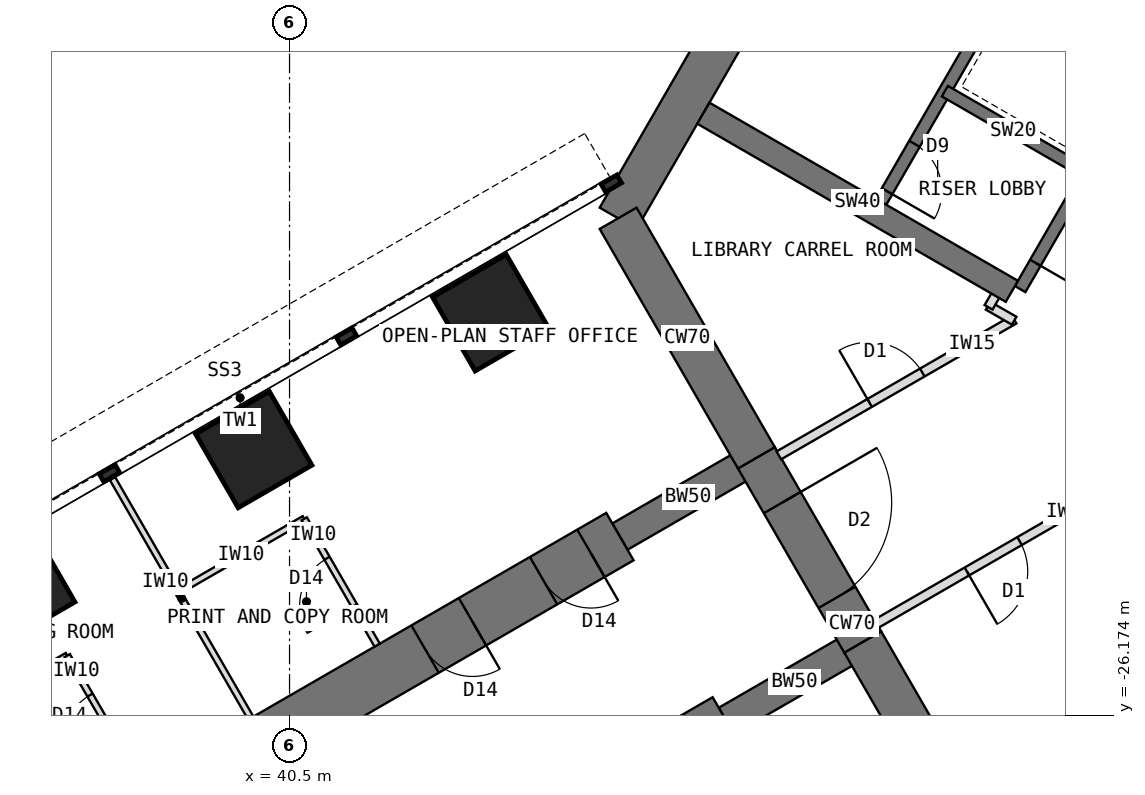
"""IFC4 building model, lengths in metres.
Left out: names, types, materials, properties, quantities, classifications, styles, units other than length and angle.
Written with IfcOpenShell. Run it as: python <this file> out.ifc"""

import sys

from ifc_helpers import new_model, si_unit, direction, frame, frame_2d, origin, origin_2d, place, context, subcontext, project, spatial, rectangle, extrude, element, fill, save


model = new_model("IFC4")
c1 = context("Model", 3, precision=1e-05, world=origin(), true_north=direction((0.0, 1.0)))
c2 = subcontext(c1, "Body", "Model", "MODEL_VIEW")
j1 = project(units=[si_unit("LENGTHUNIT", "METRE"), si_unit("PLANEANGLEUNIT", "RADIAN")], contexts=[c1])
p1 = place(None, origin())
s1 = spatial("IfcSite", under=j1, at=p1, CompositionType="ELEMENT")
p2 = place(p1, origin())
s2 = spatial("IfcBuilding", under=s1, at=p2, CompositionType="ELEMENT")
p3 = place(p2, frame((0.0, 0.0, 76.5)))
s3 = spatial("IfcBuildingStorey", under=s2, at=p3, CompositionType="ELEMENT", Elevation=76.5)
p4 = place(p3, frame((52.202, -7.092, 0.0), z_axis=(0.0, 0.0, 1.0), x_axis=(-0.500005998175, -0.866021940709, 0.0)))
e1 = element("IfcWall", 1, at=p4, inside=s3, PredefinedType="SHEAR", context=c2, shape_type="SweptSolid", body=[
    extrude(rectangle(XDim=12.596, YDim=0.7, at=frame_2d((6.298, 0.0))), origin(), (0.0, 0.0, 1.0), 4.0),
])
p5 = place(p3, frame((45.904, -18.0, 0.0), z_axis=(0.0, 0.0, 1.0), x_axis=(0.500024481964, -0.866011268655, 0.0)))
e2 = element("IfcWall", 2, at=p5, inside=s3, PredefinedType="SHEAR", context=c2, shape_type="SweptSolid", body=[
    extrude(rectangle(XDim=4.548, YDim=0.7, at=frame_2d((2.274, 0.0))), origin(), (0.0, 0.0, 1.0), 4.0),
])
p6 = place(p3, frame((48.178, -21.939, 0.0), z_axis=(0.0, 0.0, 1.0), x_axis=(0.500010275428, -0.866019471182, 0.0)))
e3 = element("IfcWall", 3, at=p6, inside=s3, PredefinedType="SHEAR", context=c2, shape_type="SweptSolid", body=[
    extrude(rectangle(XDim=3.5, YDim=0.7, at=frame_2d((1.75, 0.0))), origin(), (0.0, 0.0, 1.0), 4.0),
])
p7 = place(p6, frame((0.85, 0.0, 0.0)))
e4 = element("IfcOpeningElement", 4, at=p7, cuts=e3, PredefinedType="OPENING", context=c2, shape_type="SweptSolid", body=[
    extrude(rectangle(XDim=1.8, YDim=2.1, at=frame_2d((0.9, 1.05))), frame((0.0, 0.36, 0.0), z_axis=(0.0, -1.0, 0.0), x_axis=(1.0, 0.0, 0.0)), (0.0, 0.0, 1.0), 0.72),
])
p8 = place(p3, frame((49.928, -24.97, 0.0), z_axis=(0.0, 0.0, 1.0), x_axis=(0.499984222037, -0.866034513004, 0.0)))
e5 = element("IfcWall", 5, at=p8, inside=s3, PredefinedType="SHEAR", context=c2, shape_type="SweptSolid", body=[
    extrude(rectangle(XDim=4.548, YDim=0.7, at=frame_2d((2.274, 0.0))), origin(), (0.0, 0.0, 1.0), 4.0),
])
p9 = place(p3, frame((49.928, -24.97, 0.0), z_axis=(0.0, 0.0, 1.0), x_axis=(-0.866031863473, -0.499988811324, 0.0)))
e6 = element("IfcWall", 6, at=p9, inside=s3, PredefinedType="SHEAR", context=c2, shape_type="SweptSolid", body=[
    extrude(rectangle(XDim=2.592, YDim=0.5, at=frame_2d((1.296, 0.0))), origin(), (0.0, 0.0, 1.0), 4.0),
])
p10 = place(p3, frame((47.684, -26.266, 0.0), z_axis=(0.0, 0.0, 1.0), x_axis=(-0.866027579429, -0.499996231654, 0.0)))
e7 = element("IfcWall", 7, at=p10, inside=s3, PredefinedType="SHEAR", context=c2, shape_type="SweptSolid", body=[
    extrude(rectangle(XDim=13.2, YDim=0.9, at=frame_2d((6.6, 0.0))), origin(), (0.0, 0.0, 1.0), 4.0),
])
p11 = place(p10, frame((0.55, 0.0, 0.0)))
e8 = element("IfcOpeningElement", 8, at=p11, cuts=e7, PredefinedType="OPENING", context=c2, shape_type="SweptSolid", body=[
    extrude(rectangle(XDim=0.9, YDim=2.1, at=frame_2d((0.45, 1.05))), frame((0.0, 0.46, 0.0), z_axis=(0.0, -1.0, 0.0), x_axis=(1.0, 0.0, 0.0)), (0.0, 0.0, 1.0), 0.92),
])
p12 = place(p10, frame((2.8, 0.0, 0.0)))
e9 = element("IfcOpeningElement", 9, at=p12, cuts=e7, PredefinedType="OPENING", context=c2, shape_type="SweptSolid", body=[
    extrude(rectangle(XDim=0.9, YDim=2.1, at=frame_2d((0.45, 1.05))), frame((0.0, 0.46, 0.0), z_axis=(0.0, -1.0, 0.0), x_axis=(1.0, 0.0, 0.0)), (0.0, 0.0, 1.0), 0.92),
])
p13 = place(p10, frame((7.3, 0.0, 0.0)))
e10 = element("IfcOpeningElement", 10, at=p13, cuts=e7, PredefinedType="OPENING", context=c2, shape_type="SweptSolid", body=[
    extrude(rectangle(XDim=0.9, YDim=2.1, at=frame_2d((0.45, 1.05))), frame((0.0, 0.46, 0.0), z_axis=(0.0, -1.0, 0.0), x_axis=(1.0, 0.0, 0.0)), (0.0, 0.0, 1.0), 0.92),
])
p14 = place(p3, frame((48.178, -21.939, 0.0), z_axis=(0.0, 0.0, 1.0), x_axis=(-0.866072649678, -0.499918158782, 0.0)))
e11 = element("IfcWall", 11, at=p14, inside=s3, PredefinedType="SHEAR", context=c2, shape_type="SweptSolid", body=[
    extrude(rectangle(XDim=2.592, YDim=0.5, at=frame_2d((1.296, 0.0))), origin(), (0.0, 0.0, 1.0), 4.0),
])
p15 = place(p3, frame((45.934, -23.234, 0.0), z_axis=(0.0, 0.0, 1.0), x_axis=(-0.866019570528, -0.500010103361, 0.0)))
e12 = element("IfcWall", 12, at=p15, inside=s3, PredefinedType="SHEAR", context=c2, shape_type="SweptSolid", body=[
    extrude(rectangle(XDim=13.2, YDim=0.9, at=frame_2d((6.6, 0.0))), origin(), (0.0, 0.0, 1.0), 4.0),
])
p16 = place(p15, frame((0.55, 0.0, 0.0)))
e13 = element("IfcOpeningElement", 13, at=p16, cuts=e12, PredefinedType="OPENING", context=c2, shape_type="SweptSolid", body=[
    extrude(rectangle(XDim=0.9, YDim=2.1, at=frame_2d((0.45, 1.05))), frame((0.0, 0.46, 0.0), z_axis=(0.0, -1.0, 0.0), x_axis=(1.0, 0.0, 0.0)), (0.0, 0.0, 1.0), 0.92),
])
p17 = place(p15, frame((2.8, 0.0, 0.0)))
e14 = element("IfcOpeningElement", 14, at=p17, cuts=e12, PredefinedType="OPENING", context=c2, shape_type="SweptSolid", body=[
    extrude(rectangle(XDim=0.9, YDim=2.1, at=frame_2d((0.45, 1.05))), frame((0.0, 0.46, 0.0), z_axis=(0.0, -1.0, 0.0), x_axis=(1.0, 0.0, 0.0)), (0.0, 0.0, 1.0), 0.92),
])
p18 = place(p15, frame((7.3, 0.0, 0.0)))
e15 = element("IfcOpeningElement", 15, at=p18, cuts=e12, PredefinedType="OPENING", context=c2, shape_type="SweptSolid", body=[
    extrude(rectangle(XDim=0.9, YDim=2.1, at=frame_2d((0.45, 1.05))), frame((0.0, 0.46, 0.0), z_axis=(0.0, -1.0, 0.0), x_axis=(1.0, 0.0, 0.0)), (0.0, 0.0, 1.0), 0.92),
])
for number, where, z_axis, x_axis in (
    (16, (43.809, -19.554, 0.0), (0.0, 0.0, 1.0), (0.866, 0.5, 0.0)),
    (17, (39.912, -21.804, 0.0), (0.0, 0.0, 1.0), (0.866, 0.5, 0.0)),
    (18, (36.014, -24.054, 0.0), (0.0, 0.0, 1.0), (0.866, 0.5, 0.0)),
):
    element("IfcColumn", number, at=place(p3, frame(where, z_axis=z_axis, x_axis=x_axis)), inside=s3, PredefinedType="COLUMN", context=c2, shape_type="SweptSolid", body=[
        extrude(rectangle(XDim=1.4, YDim=1.4, at=origin_2d()), origin(), (0.0, 0.0, 1.0), 4.0),
    ])
p19 = place(p3, frame((56.516, -12.236, 0.0), z_axis=(0.0, 0.0, 1.0), x_axis=(-0.49999894854, -0.866026010844, 0.0)))
e19 = element("IfcWall", 19, at=p19, inside=s3, PredefinedType="SHEAR", context=c2, shape_type="SweptSolid", body=[
    extrude(rectangle(XDim=8.0, YDim=0.2, at=frame_2d((4.0, 0.0))), origin(), (0.0, 0.0, 1.0), 4.0),
])
p20 = place(p19, frame((6.3, 0.0, 0.0)))
e20 = element("IfcOpeningElement", 20, at=p20, cuts=e19, PredefinedType="OPENING", context=c2, shape_type="SweptSolid", body=[
    extrude(rectangle(XDim=1.2, YDim=2.1, at=frame_2d((0.6, 1.05))), frame((0.0, 0.11, 0.0), z_axis=(0.0, -1.0, 0.0), x_axis=(1.0, 0.0, 0.0)), (0.0, 0.0, 1.0), 0.22),
])
p21 = place(p3, frame((53.53, -17.209, 0.0), z_axis=(0.0, 0.0, 1.0), x_axis=(-0.866062058628, 0.499936506574, 0.0)))
e21 = element("IfcWall", 21, at=p21, inside=s3, PredefinedType="SHEAR", context=c2, shape_type="SweptSolid", body=[
    extrude(rectangle(XDim=2.6, YDim=0.2, at=frame_2d((1.3, 0.0))), origin(), (0.0, 0.0, 1.0), 4.0),
])
p22 = place(p3, frame((54.178, -10.886, 0.0), z_axis=(0.0, 0.0, 1.0), x_axis=(-0.49999894854, -0.866026010844, 0.0)))
e22 = element("IfcWall", 22, at=p22, inside=s3, PredefinedType="SHEAR", context=c2, shape_type="SweptSolid", body=[
    extrude(rectangle(XDim=8.0, YDim=0.2, at=frame_2d((4.0, 0.0))), origin(), (0.0, 0.0, 1.0), 4.0),
])
p23 = place(p22, frame((6.8, 0.0, 0.0)))
e23 = element("IfcOpeningElement", 23, at=p23, cuts=e22, PredefinedType="OPENING", context=c2, shape_type="SweptSolid", body=[
    extrude(rectangle(XDim=0.9, YDim=2.1, at=frame_2d((0.45, 1.05))), frame((0.0, 0.11, 0.0), z_axis=(0.0, -1.0, 0.0), x_axis=(1.0, 0.0, 0.0)), (0.0, 0.0, 1.0), 0.22),
])
p24 = place(p3, frame((52.38, -19.201, 0.0), z_axis=(0.0, 0.0, 1.0), x_axis=(-0.866023886965, 0.500002627198, 0.0)))
e24 = element("IfcWall", 24, at=p24, inside=s3, PredefinedType="SHEAR", context=c2, shape_type="SweptSolid", body=[
    extrude(rectangle(XDim=5.858, YDim=0.4, at=frame_2d((2.929, 0.0))), origin(), (0.0, 0.0, 1.0), 4.0),
])
p25 = place(p3, frame((39.863, -26.22, 0.0), z_axis=(0.0, 0.0, 1.0), x_axis=(-0.500022803284, 0.866012237902, 0.0)))
e25 = element("IfcWall", 25, at=p25, inside=s3, PredefinedType="PARTITIONING", context=c2, shape_type="SweptSolid", body=[
    extrude(rectangle(XDim=4.55, YDim=0.1, at=frame_2d((2.275, 0.0))), origin(), (0.0, 0.0, 1.0), 3.8),
])
p26 = place(p3, frame((40.741, -22.941, 0.0), z_axis=(0.0, 0.0, 1.0), x_axis=(-0.865980596518, -0.500077600433, 0.0)))
e26 = element("IfcWall", 26, at=p26, inside=s3, PredefinedType="PARTITIONING", context=c2, shape_type="SweptSolid", body=[
    extrude(rectangle(XDim=2.4, YDim=0.1, at=frame_2d((1.2, 0.0))), origin(), (0.0, 0.0, 1.0), 3.8),
])
p27 = place(p3, frame((41.941, -25.02, 0.0), z_axis=(0.0, 0.0, 1.0), x_axis=(-0.499957262057, 0.866050077142, 0.0)))
e27 = element("IfcWall", 27, at=p27, inside=s3, PredefinedType="PARTITIONING", context=c2, shape_type="SweptSolid", body=[
    extrude(rectangle(XDim=2.4, YDim=0.1, at=frame_2d((1.2, 0.0))), origin(), (0.0, 0.0, 1.0), 3.8),
])
p28 = place(p27, frame((0.75, 0.0, 0.0)))
e28 = element("IfcOpeningElement", 28, at=p28, cuts=e27, PredefinedType="OPENING", context=c2, shape_type="SweptSolid", body=[
    extrude(rectangle(XDim=0.9, YDim=2.1, at=frame_2d((0.45, 1.05))), frame((0.0, 0.06, 0.0), z_axis=(0.0, -1.0, 0.0), x_axis=(1.0, 0.0, 0.0)), (0.0, 0.0, 1.0), 0.12),
])
p29 = place(p3, frame((36.844, -25.191, 0.0), z_axis=(0.0, 0.0, 1.0), x_axis=(-0.865980596518, -0.500077600433, 0.0)))
e29 = element("IfcWall", 29, at=p29, inside=s3, PredefinedType="PARTITIONING", context=c2, shape_type="SweptSolid", body=[
    extrude(rectangle(XDim=2.4, YDim=0.1, at=frame_2d((1.2, 0.0))), origin(), (0.0, 0.0, 1.0), 3.8),
])
p30 = place(p3, frame((38.044, -27.27, 0.0), z_axis=(0.0, 0.0, 1.0), x_axis=(-0.500033551112, 0.866006032174, 0.0)))
e30 = element("IfcWall", 30, at=p30, inside=s3, PredefinedType="PARTITIONING", context=c2, shape_type="SweptSolid", body=[
    extrude(rectangle(XDim=2.4, YDim=0.1, at=frame_2d((1.2, 0.0))), origin(), (0.0, 0.0, 1.0), 3.8),
])
p31 = place(p30, frame((0.75, 0.0, 0.0)))
e31 = element("IfcOpeningElement", 31, at=p31, cuts=e30, PredefinedType="OPENING", context=c2, shape_type="SweptSolid", body=[
    extrude(rectangle(XDim=0.9, YDim=2.1, at=frame_2d((0.45, 1.05))), frame((0.0, 0.06, 0.0), z_axis=(0.0, -1.0, 0.0), x_axis=(1.0, 0.0, 0.0)), (0.0, 0.0, 1.0), 0.12),
])
p32 = place(p3, frame((54.017, -22.436, 0.0), z_axis=(0.0, 0.0, 1.0), x_axis=(-0.866015446554, -0.500017246033, 0.0)))
e32 = element("IfcWall", 32, at=p32, inside=s3, PredefinedType="PARTITIONING", context=c2, shape_type="SweptSolid", body=[
    extrude(rectangle(XDim=4.469, YDim=0.15, at=frame_2d((2.234, 0.0))), origin(), (0.0, 0.0, 1.0), 3.8),
])
p33 = place(p32, frame((1.744, 0.0, 0.0)))
e33 = element("IfcOpeningElement", 33, at=p33, cuts=e32, PredefinedType="OPENING", context=c2, shape_type="SweptSolid", body=[
    extrude(rectangle(XDim=1.0, YDim=2.1, at=frame_2d((0.5, 1.05))), frame((0.0, 0.085, 0.0), z_axis=(0.0, -1.0, 0.0), x_axis=(1.0, 0.0, 0.0)), (0.0, 0.0, 1.0), 0.17),
])
p34 = place(p3, frame((48.548, -21.898, 0.0), z_axis=(0.0, 0.0, 1.0), x_axis=(0.866025445582, 0.499999927604, 0.0)))
e34 = element("IfcWall", 34, at=p34, inside=s3, PredefinedType="PARTITIONING", context=c2, shape_type="SweptSolid", body=[
    extrude(rectangle(XDim=4.468, YDim=0.15, at=frame_2d((2.234, 0.0))), origin(), (0.0, 0.0, 1.0), 3.8),
])
p35 = place(p34, frame((1.724, 0.0, 0.0)))
e35 = element("IfcOpeningElement", 35, at=p35, cuts=e34, PredefinedType="OPENING", context=c2, shape_type="SweptSolid", body=[
    extrude(rectangle(XDim=1.0, YDim=2.1, at=frame_2d((0.5, 1.05))), frame((0.0, 0.085, 0.0), z_axis=(0.0, -1.0, 0.0), x_axis=(1.0, 0.0, 0.0)), (0.0, 0.0, 1.0), 0.17),
])
p36 = place(p3, frame((52.417, -19.684, 0.0), z_axis=(0.0, 0.0, 1.0), x_axis=(-0.865831790172, 0.50033519877, 0.0)))
e36 = element("IfcWall", 36, at=p36, inside=s3, PredefinedType="PARTITIONING", context=c2, shape_type="SweptSolid", body=[
    extrude(rectangle(XDim=0.494, YDim=0.15, at=frame_2d((0.247, 0.0))), origin(), (0.0, 0.0, 1.0), 3.8),
])
p37 = place(p3, frame((51.997, -19.464, 0.0), z_axis=(0.0, 0.0, 1.0), x_axis=(0.499804398801, 0.866138304741, 0.0)))
e37 = element("IfcWall", 37, at=p37, inside=s3, PredefinedType="PARTITIONING", context=c2, shape_type="SweptSolid", body=[
    extrude(rectangle(XDim=0.43, YDim=0.15, at=frame_2d((0.215, 0.0))), origin(), (0.0, 0.0, 1.0), 3.8),
])
p38 = place(p20, origin())
e38 = element("IfcDoor", 38, at=p38, inside=s3, OperationType="SINGLE_SWING_RIGHT", PredefinedType="DOOR", context=c2, shape_type="SweptSolid", body=[
    extrude(rectangle(XDim=1.2, YDim=2.1, at=frame_2d((0.6, 1.05))), frame((0.0, 0.025, 0.0), z_axis=(0.0, -1.0, 0.0), x_axis=(1.0, 0.0, 0.0)), (0.0, 0.0, 1.0), 0.05),
])
fill(e20, e38)
p39 = place(p23, origin())
e39 = element("IfcDoor", 39, at=p39, inside=s3, OperationType="SINGLE_SWING_RIGHT", PredefinedType="DOOR", context=c2, shape_type="SweptSolid", body=[
    extrude(rectangle(XDim=0.9, YDim=2.1, at=frame_2d((0.45, 1.05))), frame((0.0, 0.025, 0.0), z_axis=(0.0, -1.0, 0.0), x_axis=(1.0, 0.0, 0.0)), (0.0, 0.0, 1.0), 0.05),
])
fill(e23, e39)
p40 = place(p7, origin())
e40 = element("IfcDoor", 40, at=p40, inside=s3, OperationType="DOUBLE_DOOR_DOUBLE_SWING", PredefinedType="DOOR", context=c2, shape_type="SweptSolid", body=[
    extrude(rectangle(XDim=1.72, YDim=2.06, at=frame_2d((0.9, 1.03))), frame((0.0, 0.025, 0.0), z_axis=(0.0, -1.0, 0.0), x_axis=(1.0, 0.0, 0.0)), (0.0, 0.0, 1.0), 0.05),
    extrude(rectangle(XDim=0.04, YDim=2.1, at=frame_2d((0.02, 1.05))), frame((0.0, 0.35, 0.0), z_axis=(0.0, -1.0, 0.0), x_axis=(1.0, 0.0, 0.0)), (0.0, 0.0, 1.0), 0.699),
    extrude(rectangle(XDim=0.04, YDim=2.1, at=frame_2d((1.78, 1.05))), frame((0.0, 0.35, 0.0), z_axis=(0.0, -1.0, 0.0), x_axis=(1.0, 0.0, 0.0)), (0.0, 0.0, 1.0), 0.699),
    extrude(rectangle(XDim=1.72, YDim=0.04, at=frame_2d((0.9, 2.08))), frame((0.0, 0.35, 0.0), z_axis=(0.0, -1.0, 0.0), x_axis=(1.0, 0.0, 0.0)), (0.0, 0.0, 1.0), 0.699),
])
fill(e4, e40)
p41 = place(p28, origin())
e41 = element("IfcDoor", 41, at=p41, inside=s3, OperationType="SINGLE_SWING_LEFT", PredefinedType="DOOR", context=c2, shape_type="SweptSolid", body=[
    extrude(rectangle(XDim=0.9, YDim=2.1, at=frame_2d((0.45, 1.05))), frame((0.0, 0.025, 0.0), z_axis=(0.0, -1.0, 0.0), x_axis=(1.0, 0.0, 0.0)), (0.0, 0.0, 1.0), 0.05),
])
fill(e28, e41)
p42 = place(p31, origin())
e42 = element("IfcDoor", 42, at=p42, inside=s3, OperationType="SINGLE_SWING_LEFT", PredefinedType="DOOR", context=c2, shape_type="SweptSolid", body=[
    extrude(rectangle(XDim=0.9, YDim=2.1, at=frame_2d((0.45, 1.05))), frame((0.0, 0.025, 0.0), z_axis=(0.0, -1.0, 0.0), x_axis=(1.0, 0.0, 0.0)), (0.0, 0.0, 1.0), 0.05),
])
fill(e31, e42)
p43 = place(p35, origin())
e43 = element("IfcDoor", 43, at=p43, inside=s3, OperationType="SINGLE_SWING_LEFT", PredefinedType="DOOR", context=c2, shape_type="SweptSolid", body=[
    extrude(rectangle(XDim=1.0, YDim=2.1, at=frame_2d((0.5, 1.05))), frame((0.0, 0.025, 0.0), z_axis=(0.0, -1.0, 0.0), x_axis=(1.0, 0.0, 0.0)), (0.0, 0.0, 1.0), 0.05),
])
fill(e35, e43)
p44 = place(p33, origin())
e44 = element("IfcDoor", 44, at=p44, inside=s3, OperationType="SINGLE_SWING_RIGHT", PredefinedType="DOOR", context=c2, shape_type="SweptSolid", body=[
    extrude(rectangle(XDim=1.0, YDim=2.1, at=frame_2d((0.5, 1.05))), frame((0.0, 0.025, 0.0), z_axis=(0.0, -1.0, 0.0), x_axis=(1.0, 0.0, 0.0)), (0.0, 0.0, 1.0), 0.05),
])
fill(e33, e44)
p45 = place(p11, origin())
e45 = element("IfcDoor", 45, at=p45, inside=s3, OperationType="SINGLE_SWING_LEFT", PredefinedType="DOOR", context=c2, shape_type="SweptSolid", body=[
    extrude(rectangle(XDim=0.82, YDim=2.06, at=frame_2d((0.45, 1.03))), frame((0.0, 0.025, 0.0), z_axis=(0.0, -1.0, 0.0), x_axis=(1.0, 0.0, 0.0)), (0.0, 0.0, 1.0), 0.05),
    extrude(rectangle(XDim=0.04, YDim=2.1, at=frame_2d((0.02, 1.05))), frame((0.0, 0.45, 0.0), z_axis=(0.0, -1.0, 0.0), x_axis=(1.0, 0.0, 0.0)), (0.0, 0.0, 1.0), 0.899),
    extrude(rectangle(XDim=0.04, YDim=2.1, at=frame_2d((0.88, 1.05))), frame((0.0, 0.45, 0.0), z_axis=(0.0, -1.0, 0.0), x_axis=(1.0, 0.0, 0.0)), (0.0, 0.0, 1.0), 0.899),
    extrude(rectangle(XDim=0.82, YDim=0.04, at=frame_2d((0.45, 2.08))), frame((0.0, 0.45, 0.0), z_axis=(0.0, -1.0, 0.0), x_axis=(1.0, 0.0, 0.0)), (0.0, 0.0, 1.0), 0.899),
])
fill(e8, e45)
p46 = place(p16, origin())
e46 = element("IfcDoor", 46, at=p46, inside=s3, OperationType="SINGLE_SWING_LEFT", PredefinedType="DOOR", context=c2, shape_type="SweptSolid", body=[
    extrude(rectangle(XDim=0.82, YDim=2.06, at=frame_2d((0.45, 1.03))), frame((0.0, 0.025, 0.0), z_axis=(0.0, -1.0, 0.0), x_axis=(1.0, 0.0, 0.0)), (0.0, 0.0, 1.0), 0.05),
    extrude(rectangle(XDim=0.04, YDim=2.1, at=frame_2d((0.02, 1.05))), frame((0.0, 0.45, 0.0), z_axis=(0.0, -1.0, 0.0), x_axis=(1.0, 0.0, 0.0)), (0.0, 0.0, 1.0), 0.899),
    extrude(rectangle(XDim=0.04, YDim=2.1, at=frame_2d((0.88, 1.05))), frame((0.0, 0.45, 0.0), z_axis=(0.0, -1.0, 0.0), x_axis=(1.0, 0.0, 0.0)), (0.0, 0.0, 1.0), 0.899),
    extrude(rectangle(XDim=0.82, YDim=0.04, at=frame_2d((0.45, 2.08))), frame((0.0, 0.45, 0.0), z_axis=(0.0, -1.0, 0.0), x_axis=(1.0, 0.0, 0.0)), (0.0, 0.0, 1.0), 0.899),
])
fill(e13, e46)
p47 = place(p17, origin())
e47 = element("IfcDoor", 47, at=p47, inside=s3, OperationType="SINGLE_SWING_LEFT", PredefinedType="DOOR", context=c2, shape_type="SweptSolid", body=[
    extrude(rectangle(XDim=0.82, YDim=2.06, at=frame_2d((0.45, 1.03))), frame((0.0, 0.025, 0.0), z_axis=(0.0, -1.0, 0.0), x_axis=(1.0, 0.0, 0.0)), (0.0, 0.0, 1.0), 0.05),
    extrude(rectangle(XDim=0.04, YDim=2.1, at=frame_2d((0.02, 1.05))), frame((0.0, 0.45, 0.0), z_axis=(0.0, -1.0, 0.0), x_axis=(1.0, 0.0, 0.0)), (0.0, 0.0, 1.0), 0.899),
    extrude(rectangle(XDim=0.04, YDim=2.1, at=frame_2d((0.88, 1.05))), frame((0.0, 0.45, 0.0), z_axis=(0.0, -1.0, 0.0), x_axis=(1.0, 0.0, 0.0)), (0.0, 0.0, 1.0), 0.899),
    extrude(rectangle(XDim=0.82, YDim=0.04, at=frame_2d((0.45, 2.08))), frame((0.0, 0.45, 0.0), z_axis=(0.0, -1.0, 0.0), x_axis=(1.0, 0.0, 0.0)), (0.0, 0.0, 1.0), 0.899),
])
fill(e14, e47)
save(model, sys.argv[1])
